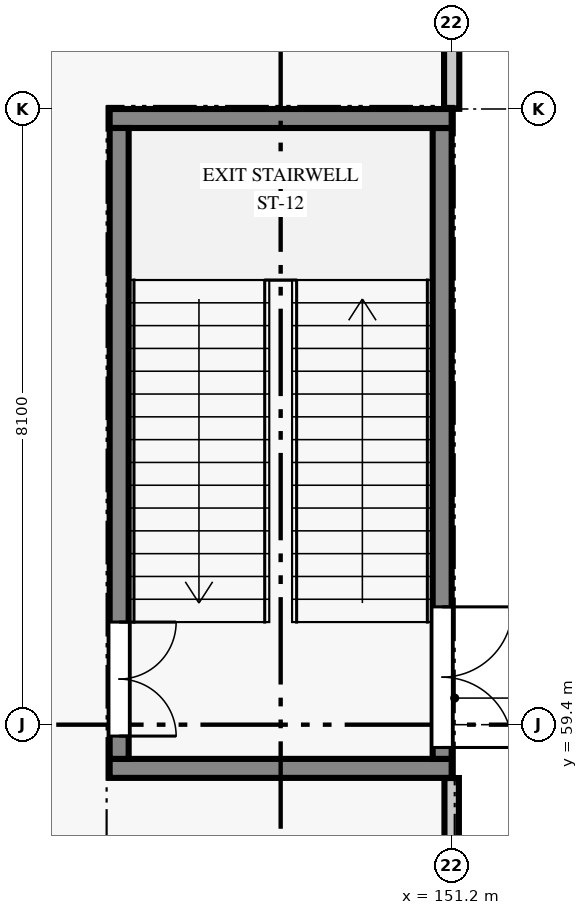
"""IFC4 building model, lengths in metres.
Left out: names, types, materials, properties, quantities, classifications, styles, units other than length and angle.
Written with IfcOpenShell. Run it as: python <this file> out.ifc"""

import sys

from ifc_helpers import new_model, si_unit, direction, frame, frame_2d, origin, place, context, subcontext, project, spatial, rectangle, extrude, element, fill, save


model = new_model("IFC4")
c1 = context("Model", 3, precision=1e-05, world=origin(), true_north=direction((0.0, 1.0)))
c2 = subcontext(c1, "Body", "Model", "MODEL_VIEW")
j1 = project(units=[si_unit("LENGTHUNIT", "METRE"), si_unit("PLANEANGLEUNIT", "RADIAN")], contexts=[c1])
p1 = place(None, origin())
s1 = spatial("IfcSite", under=j1, at=p1, CompositionType="ELEMENT")
p2 = place(p1, origin())
s2 = spatial("IfcBuilding", under=s1, at=p2, CompositionType="ELEMENT")
p3 = place(p2, origin())
s3 = spatial("IfcBuildingStorey", under=s2, at=p3, CompositionType="ELEMENT", Elevation=0.0)
p4 = place(p3, frame((151.2, 54.202, 0.0), z_axis=(0.0, 0.0, 1.0), x_axis=(0.0, 1.0, 0.0)))
e1 = element("IfcWall", 1, at=p4, inside=s3, PredefinedType="STANDARD", context=c2, shape_type="SweptSolid", body=[
    extrude(rectangle(XDim=4.496, YDim=0.19, at=frame_2d((2.248, 0.0))), origin(), (0.0, 0.0, 1.0), 4.565),
])
p5 = place(p4, frame((1.448, 0.0, 0.0)))
e2 = element("IfcOpeningElement", 2, at=p5, cuts=e1, PredefinedType="OPENING", context=c2, shape_type="SweptSolid", body=[
    extrude(rectangle(XDim=1.6, YDim=2.2, at=frame_2d((0.8, 1.1))), frame((0.0, 0.105, 0.0), z_axis=(0.0, -1.0, 0.0), x_axis=(1.0, 0.0, 0.0)), (0.0, 0.0, 1.0), 0.21),
])
p6 = place(p3, frame((151.2, 67.502, 0.0), z_axis=(0.0, 0.0, 1.0), x_axis=(0.0, 1.0, 0.0)))
e3 = element("IfcWall", 3, at=p6, inside=s3, PredefinedType="STANDARD", context=c2, shape_type="SweptSolid", body=[
    extrude(rectangle(XDim=7.778, YDim=0.2, at=frame_2d((3.889, 0.0))), origin(), (0.0, 0.0, 1.0), 4.565),
])
p7 = place(p6, frame((3.129, 0.0, 0.0)))
e4 = element("IfcOpeningElement", 4, at=p7, cuts=e3, PredefinedType="OPENING", context=c2, shape_type="SweptSolid", body=[
    extrude(rectangle(XDim=1.52, YDim=2.18, at=frame_2d((0.76, 1.09))), frame((0.0, 0.11, 0.0), z_axis=(0.0, -1.0, 0.0), x_axis=(1.0, 0.0, 0.0)), (0.0, 0.0, 1.0), 0.22),
])
p8 = place(p3, frame((146.7, 58.825, 0.0), z_axis=(0.0, 0.0, 1.0), x_axis=(1.0, 0.0, 0.0)))
e5 = element("IfcWall", 5, at=p8, inside=s3, PredefinedType="SHEAR", context=c2, shape_type="SweptSolid", body=[
    extrude(rectangle(XDim=4.5, YDim=0.25, at=frame_2d((2.25, 0.0))), origin(), (0.0, 0.0, 1.0), 4.565),
])
p9 = place(p3, frame((151.075, 58.95, 0.0), z_axis=(0.0, 0.0, 1.0), x_axis=(0.0, 1.0, 0.0)))
e6 = element("IfcWall", 6, at=p9, inside=s3, PredefinedType="SHEAR", context=c2, shape_type="SweptSolid", body=[
    extrude(rectangle(XDim=8.3, YDim=0.25, at=frame_2d((4.15, 0.0))), origin(), (0.0, 0.0, 1.0), 4.565),
])
p10 = place(p9, frame((0.15, 0.0, 0.0)))
e7 = element("IfcOpeningElement", 7, at=p10, cuts=e6, PredefinedType="OPENING", context=c2, shape_type="SweptSolid", body=[
    extrude(rectangle(XDim=1.85, YDim=2.2, at=frame_2d((0.925, 1.1))), frame((0.0, 0.135, 0.0), z_axis=(0.0, -1.0, 0.0), x_axis=(1.0, 0.0, 0.0)), (0.0, 0.0, 1.0), 0.27),
])
p11 = place(p3, frame((151.2, 67.375, 0.0), z_axis=(0.0, 0.0, 1.0), x_axis=(-1.0, 0.0, 0.0)))
e8 = element("IfcWall", 8, at=p11, inside=s3, PredefinedType="SHEAR", context=c2, shape_type="SweptSolid", body=[
    extrude(rectangle(XDim=4.5, YDim=0.25, at=frame_2d((2.25, 0.0))), origin(), (0.0, 0.0, 1.0), 4.565),
])
p12 = place(p3, frame((146.825, 67.25, 0.0), z_axis=(0.0, 0.0, 1.0), x_axis=(0.0, -1.0, 0.0)))
e9 = element("IfcWall", 9, at=p12, inside=s3, PredefinedType="SHEAR", context=c2, shape_type="SweptSolid", body=[
    extrude(rectangle(XDim=8.3, YDim=0.25, at=frame_2d((4.15, 0.0))), origin(), (0.0, 0.0, 1.0), 4.565),
])
p13 = place(p12, frame((6.5, 0.0, 0.0)))
e10 = element("IfcOpeningElement", 10, at=p13, cuts=e9, PredefinedType="OPENING", context=c2, shape_type="SweptSolid", body=[
    extrude(rectangle(XDim=1.5, YDim=2.15, at=frame_2d((0.75, 1.075))), frame((0.0, 0.135, 0.0), z_axis=(0.0, -1.0, 0.0), x_axis=(1.0, 0.0, 0.0)), (0.0, 0.0, 1.0), 0.27),
])
p14 = place(p10, frame((1.85, 0.0, 0.0), z_axis=(0.0, 0.0, 1.0), x_axis=(-1.0, 0.0, 0.0)))
e11 = element("IfcDoor", 11, at=p14, inside=s3, OperationType="DOUBLE_DOOR_SINGLE_SWING", PredefinedType="DOOR", context=c2, shape_type="SweptSolid", body=[
    extrude(rectangle(XDim=1.85, YDim=2.2, at=frame_2d((0.925, 1.1))), frame((0.0, 0.025, 0.0), z_axis=(0.0, -1.0, 0.0), x_axis=(1.0, 0.0, 0.0)), (0.0, 0.0, 1.0), 0.05),
])
fill(e7, e11)
p15 = place(p13, origin())
e12 = element("IfcDoor", 12, at=p15, inside=s3, OperationType="DOUBLE_DOOR_SINGLE_SWING", PredefinedType="DOOR", context=c2, shape_type="SweptSolid", body=[
    extrude(rectangle(XDim=1.5, YDim=2.15, at=frame_2d((0.75, 1.075))), frame((0.0, 0.025, 0.0), z_axis=(0.0, -1.0, 0.0), x_axis=(1.0, 0.0, 0.0)), (0.0, 0.0, 1.0), 0.05),
])
fill(e10, e12)
save(model, sys.argv[1])
